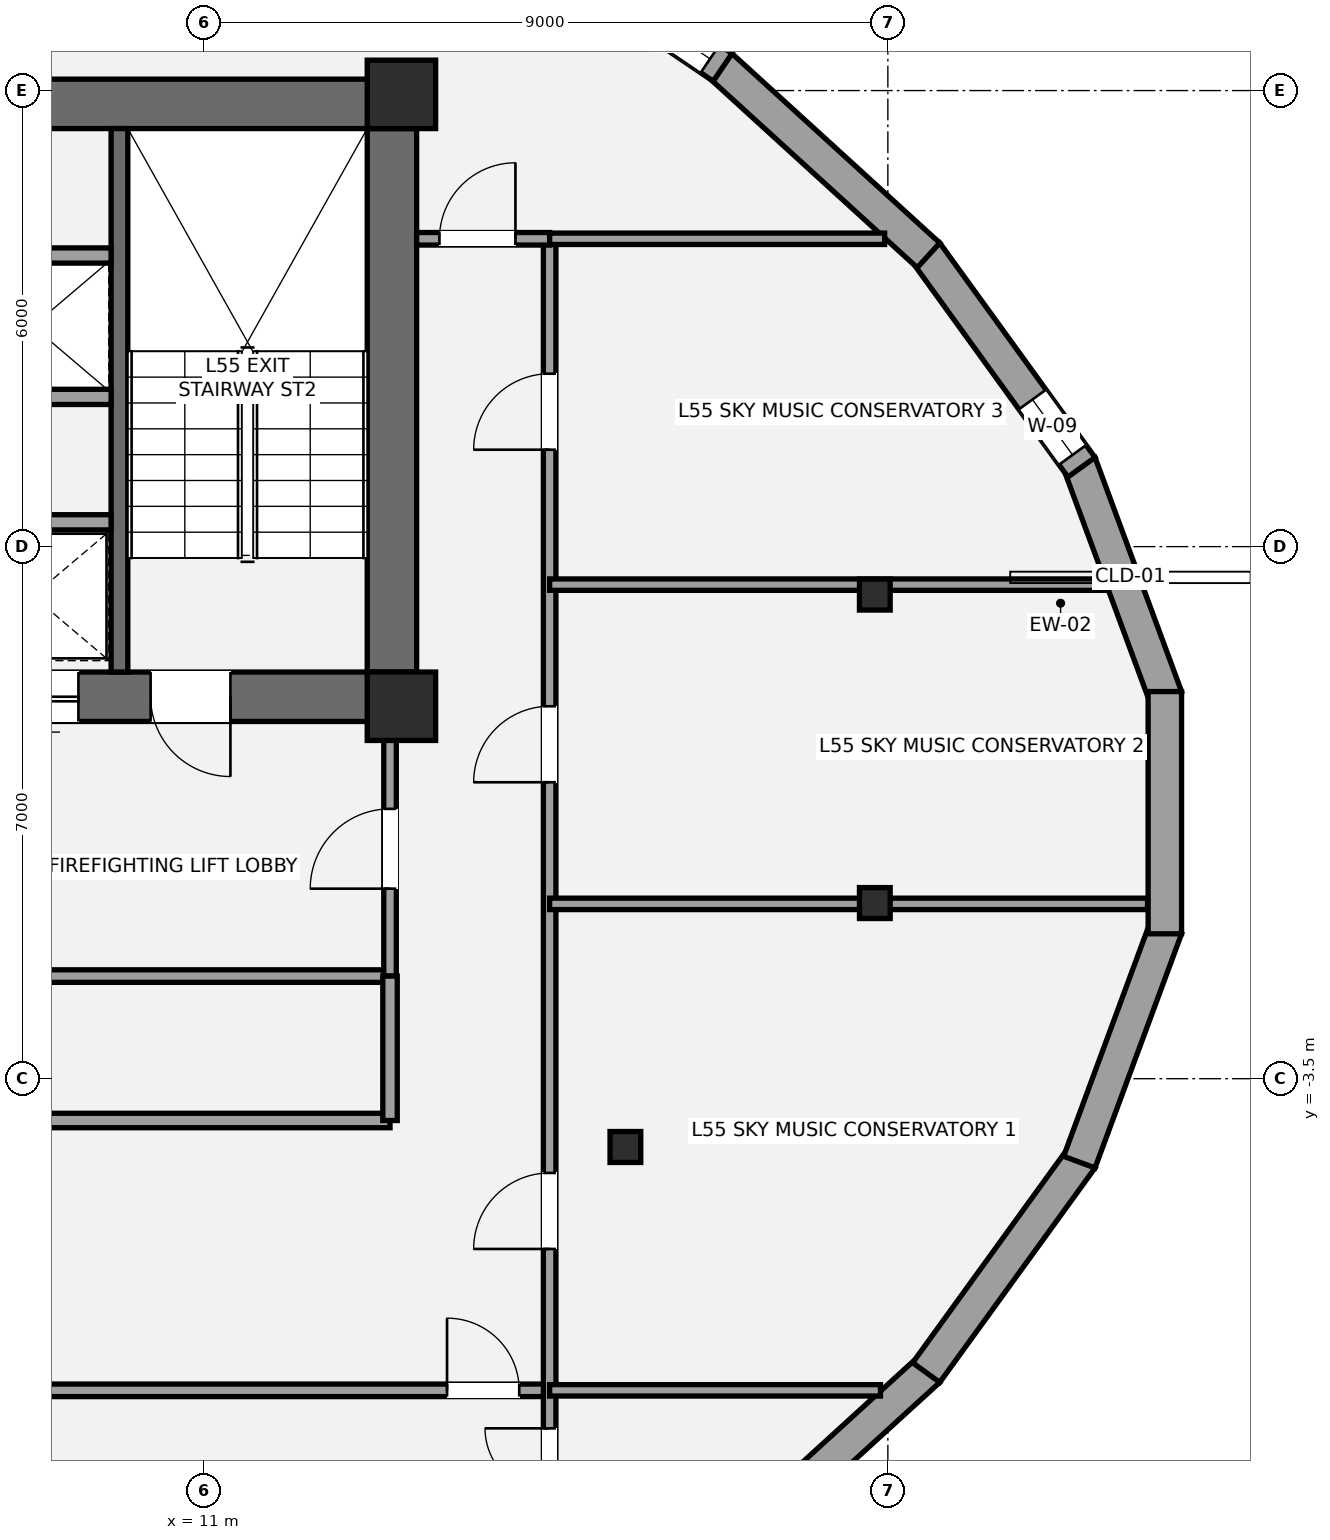
"""IFC4 building model, lengths in metres.
Left out: names, types, materials, properties, quantities, classifications, styles, units other than length and angle.
Written with IfcOpenShell. Run it as: python <this file> out.ifc"""

import sys

from ifc_helpers import new_model, si_unit, direction, frame, frame_2d, origin, origin_2d, place, context, subcontext, project, spatial, rectangle, i_section, extrude, element, fill, save


model = new_model("IFC4")
c1 = context("Model", 3, precision=1e-05, world=origin(), true_north=direction((0.0, 1.0)))
c2 = subcontext(c1, "Body", "Model", "MODEL_VIEW")
j1 = project(units=[si_unit("LENGTHUNIT", "METRE"), si_unit("PLANEANGLEUNIT", "RADIAN")], contexts=[c1])
p1 = place(None, origin())
s1 = spatial("IfcSite", under=j1, at=p1, CompositionType="ELEMENT")
p2 = place(p1, origin())
s2 = spatial("IfcBuilding", under=s1, at=p2, CompositionType="ELEMENT")
p3 = place(p2, frame((0.0, 0.0, 198.2)))
s3 = spatial("IfcBuildingStorey", under=s2, at=p3, CompositionType="ELEMENT", Elevation=198.2)
p4 = place(p3, frame((13.475, 1.2, 0.0), z_axis=(0.0, 0.0, 1.0), x_axis=(0.0, 1.0, 0.0)))
e1 = element("IfcWall", 1, at=p4, inside=s3, PredefinedType="SHEAR", context=c2, shape_type="SweptSolid", body=[
    extrude(rectangle(XDim=8.45, YDim=0.65, at=frame_2d((4.225, 0.0))), origin(), (0.0, 0.0, 1.0), 3.2),
])
p5 = place(p3, frame((4.475, 9.325, 0.0), z_axis=(0.0, 0.0, 1.0), x_axis=(1.0, 0.0, 0.0)))
e2 = element("IfcWall", 2, at=p5, inside=s3, PredefinedType="SHEAR", context=c2, shape_type="SweptSolid", body=[
    extrude(rectangle(XDim=9.325, YDim=0.65, at=frame_2d((4.663, 0.0))), origin(), (0.0, 0.0, 1.0), 3.2),
])
p6 = place(p3, frame((13.8, 1.525, 0.0), z_axis=(0.0, 0.0, 1.0), x_axis=(-1.0, 0.0, 0.0)))
e3 = element("IfcWall", 3, at=p6, inside=s3, PredefinedType="SHEAR", context=c2, shape_type="SweptSolid", body=[
    extrude(rectangle(XDim=8.925, YDim=0.65, at=frame_2d((4.462, 0.0))), origin(), (0.0, 0.0, 1.0), 3.2),
])
p7 = place(p6, frame((2.45, 0.0, 0.0)))
e4 = element("IfcOpeningElement", 4, at=p7, cuts=e3, PredefinedType="OPENING", context=c2, shape_type="SweptSolid", body=[
    extrude(rectangle(XDim=1.05, YDim=2.15, at=frame_2d((0.525, 1.075))), frame((0.0, 0.335, 0.0), z_axis=(0.0, -1.0, 0.0), x_axis=(1.0, 0.0, 0.0)), (0.0, 0.0, 1.0), 0.67),
])
p8 = place(p6, frame((4.45, 0.0, 0.0)))
e5 = element("IfcOpeningElement", 5, at=p8, cuts=e3, PredefinedType="OPENING", context=c2, shape_type="SweptSolid", body=[
    extrude(rectangle(XDim=1.1, YDim=2.2, at=frame_2d((0.55, 1.1))), frame((0.0, 0.335, 0.0), z_axis=(0.0, -1.0, 0.0), x_axis=(1.0, 0.0, 0.0)), (0.0, 0.0, 1.0), 0.67),
])
p9 = place(p3, frame((9.89, 1.85, 0.0), z_axis=(0.0, 0.0, 1.0), x_axis=(0.0, 1.0, 0.0)))
e6 = element("IfcWall", 6, at=p9, inside=s3, PredefinedType="SHEAR", context=c2, shape_type="SweptSolid", body=[
    extrude(rectangle(XDim=7.15, YDim=0.22, at=frame_2d((3.575, 0.0))), origin(), (0.0, 0.0, 1.0), 3.2),
])
for number, where, z_axis, x_axis in (
    (7, (13.6, 1.4, 0.0), (0.0, 0.0, 1.0), (1.0, 0.0, 0.0)),
    (8, (13.6, 9.45, 0.0), (0.0, 0.0, 1.0), (1.0, 0.0, 0.0)),
):
    element("IfcColumn", number, at=place(p3, frame(where, z_axis=z_axis, x_axis=x_axis)), inside=s3, PredefinedType="COLUMN", context=c2, shape_type="SweptSolid", body=[
        extrude(rectangle(XDim=0.9, YDim=0.9, at=origin_2d()), origin(), (0.0, 0.0, 1.0), 3.2),
    ])
for number, where, z_axis, x_axis in (
    (9, (19.828, 2.869, 0.0), (0.0, 0.0, 1.0), (1.0, 0.0, 0.0)),
    (10, (16.547, -4.398, 0.0), (0.0, 0.0, 1.0), (1.0, 0.0, 0.0)),
    (11, (19.828, -1.189, 0.0), (0.0, 0.0, 1.0), (1.0, 0.0, 0.0)),
):
    element("IfcColumn", number, at=place(p3, frame(where, z_axis=z_axis, x_axis=x_axis)), inside=s3, PredefinedType="COLUMN", context=c2, shape_type="SweptSolid", body=[
        extrude(i_section(OverallWidth=0.404, OverallDepth=0.407, WebThickness=0.027, FlangeThickness=0.044, at=origin_2d()), origin(), (0.0, 0.0, 1.0), 3.2),
    ])
p10 = place(p3, frame((22.519, 4.597, 0.0), z_axis=(0.0, 0.0, 1.0), x_axis=(0.346793746495, -0.937941414691, 0.0)))
e12 = element("IfcWall", 12, at=p10, inside=s3, PredefinedType="STANDARD", context=c2, shape_type="SweptSolid", body=[
    extrude(rectangle(XDim=3.284, YDim=0.44, at=frame_2d((1.642, 0.0))), origin(), (0.0, 0.0, 1.0), 2.255),
])
p11 = place(p3, frame((20.505, 7.366, 0.0), z_axis=(0.0, 0.0, 1.0), x_axis=(0.586378206793, -0.810037405678, 0.0)))
e13 = element("IfcWall", 13, at=p11, inside=s3, PredefinedType="STANDARD", context=c2, shape_type="SweptSolid", body=[
    extrude(rectangle(XDim=3.483, YDim=0.44, at=frame_2d((1.742, 0.0))), origin(), (0.0, 0.0, 1.0), 2.255),
])
p12 = place(p11, frame((2.383, 0.0, 0.42)))
e14 = element("IfcOpeningElement", 14, at=p12, cuts=e13, PredefinedType="OPENING", context=c2, shape_type="SweptSolid", body=[
    extrude(rectangle(XDim=0.9, YDim=1.35, at=frame_2d((0.45, 0.675))), frame((0.0, 0.23, 0.0), z_axis=(0.0, -1.0, 0.0), x_axis=(1.0, 0.0, 0.0)), (0.0, 0.0, 1.0), 0.46),
])
p13 = place(p3, frame((17.801, 9.824, 0.0), z_axis=(0.0, 0.0, 1.0), x_axis=(0.738992571182, -0.67371357396, 0.0)))
e15 = element("IfcWall", 15, at=p13, inside=s3, PredefinedType="STANDARD", context=c2, shape_type="SweptSolid", body=[
    extrude(rectangle(XDim=3.699, YDim=0.44, at=frame_2d((1.849, 0.0))), origin(), (0.0, 0.0, 1.0), 2.255),
])
p14 = place(p3, frame((14.607, 11.987, 0.0), z_axis=(0.0, 0.0, 1.0), x_axis=(0.827697624009, -0.561174342972, 0.0)))
e16 = element("IfcWall", 16, at=p14, inside=s3, PredefinedType="STANDARD", context=c2, shape_type="SweptSolid", body=[
    extrude(rectangle(XDim=3.888, YDim=0.44, at=frame_2d((1.944, 0.0))), origin(), (0.0, 0.0, 1.0), 2.255),
])
p15 = place(p14, frame((2.789, 0.0, 0.58)))
e17 = element("IfcOpeningElement", 17, at=p15, cuts=e16, PredefinedType="OPENING", context=c2, shape_type="SweptSolid", body=[
    extrude(rectangle(XDim=0.9, YDim=1.35, at=frame_2d((0.45, 0.675))), frame((0.0, 0.23, 0.0), z_axis=(0.0, -1.0, 0.0), x_axis=(1.0, 0.0, 0.0)), (0.0, 0.0, 1.0), 0.46),
])
p16 = place(p3, frame((20.535, -7.333, 0.0), z_axis=(0.0, 0.0, 1.0), x_axis=(-0.738992571182, -0.67371357396, 0.0)))
e18 = element("IfcWall", 18, at=p16, inside=s3, PredefinedType="STANDARD", context=c2, shape_type="SweptSolid", body=[
    extrude(rectangle(XDim=3.699, YDim=0.44, at=frame_2d((1.849, 0.0))), origin(), (0.0, 0.0, 1.0), 2.255),
])
p17 = place(p3, frame((22.547, -4.545, 0.0), z_axis=(0.0, 0.0, 1.0), x_axis=(-0.586378206793, -0.810037405678, 0.0)))
e19 = element("IfcWall", 19, at=p17, inside=s3, PredefinedType="STANDARD", context=c2, shape_type="SweptSolid", body=[
    extrude(rectangle(XDim=3.483, YDim=0.44, at=frame_2d((1.742, 0.0))), origin(), (0.0, 0.0, 1.0), 2.255),
])
p18 = place(p3, frame((23.658, -1.517, 0.0), z_axis=(0.0, 0.0, 1.0), x_axis=(-0.346793746495, -0.937941414691, 0.0)))
e20 = element("IfcWall", 20, at=p18, inside=s3, PredefinedType="STANDARD", context=c2, shape_type="SweptSolid", body=[
    extrude(rectangle(XDim=3.284, YDim=0.44, at=frame_2d((1.642, 0.0))), origin(), (0.0, 0.0, 1.0), 2.255),
])
p19 = place(p3, frame((23.644, 1.594, 0.0), z_axis=(0.0, 0.0, 1.0), x_axis=(0.0, -1.0, 0.0)))
e21 = element("IfcWall", 21, at=p19, inside=s3, PredefinedType="STANDARD", context=c2, shape_type="SweptSolid", body=[
    extrude(rectangle(XDim=3.187, YDim=0.44, at=frame_2d((1.594, 0.0))), origin(), (0.0, 0.0, 1.0), 2.259),
])
p20 = place(p3, frame((7.2, -2.15, 0.0), z_axis=(0.0, 0.0, 1.0), x_axis=(1.0, 0.0, 0.0)))
e22 = element("IfcWall", 22, at=p20, inside=s3, PredefinedType="PARTITIONING", context=c2, shape_type="SweptSolid", body=[
    extrude(rectangle(XDim=6.25, YDim=0.165, at=frame_2d((3.125, 0.0))), origin(), (0.0, 0.0, 1.0), 2.96),
])
p21 = place(p3, frame((13.45, -2.15, 0.0), z_axis=(0.0, 0.0, 1.0), x_axis=(0.0, 1.0, 0.0)))
e23 = element("IfcWall", 23, at=p21, inside=s3, PredefinedType="PARTITIONING", context=c2, shape_type="SweptSolid", body=[
    extrude(rectangle(XDim=3.4, YDim=0.165, at=frame_2d((1.7, 0.0))), origin(), (0.0, 0.0, 1.0), 2.413),
])
p22 = place(p21, frame((1.15, 0.0, 0.0)))
e24 = element("IfcOpeningElement", 24, at=p22, cuts=e23, PredefinedType="OPENING", context=c2, shape_type="SweptSolid", body=[
    extrude(rectangle(XDim=1.05, YDim=2.15, at=frame_2d((0.525, 1.075))), frame((0.0, 0.093, 0.0), z_axis=(0.0, -1.0, 0.0), x_axis=(1.0, 0.0, 0.0)), (0.0, 0.0, 1.0), 0.185),
])
p23 = place(p3, frame((5.525, 3.82, 0.0), z_axis=(0.0, 0.0, 1.0), x_axis=(1.0, 0.0, 0.0)))
e25 = element("IfcWall", 25, at=p23, inside=s3, PredefinedType="SOLIDWALL", context=c2, shape_type="SweptSolid", body=[
    extrude(rectangle(XDim=4.255, YDim=0.2, at=frame_2d((2.127, 0.0))), origin(), (0.0, 0.0, 1.0), 2.96),
])
p24 = place(p23, frame((0.65, 0.0, 0.0)))
e26 = element("IfcOpeningElement", 26, at=p24, cuts=e25, PredefinedType="OPENING", context=c2, shape_type="SweptSolid", body=[
    extrude(rectangle(XDim=1.2, YDim=2.2, at=frame_2d((0.6, 1.1))), frame((0.0, 0.11, 0.0), z_axis=(0.0, -1.0, 0.0), x_axis=(1.0, 0.0, 0.0)), (0.0, 0.0, 1.0), 0.22),
])
for number, where, z_axis, x_axis in (
    (27, (5.525, 5.47, 0.0), (0.0, 0.0, 1.0), (1.0, 0.0, 0.0)),
    (28, (5.525, 7.33, 0.0), (0.0, 0.0, 1.0), (1.0, 0.0, 0.0)),
):
    element("IfcWall", number, at=place(p3, frame(where, z_axis=z_axis, x_axis=x_axis)), inside=s3, PredefinedType="SOLIDWALL", context=c2, shape_type="SweptSolid", body=[
        extrude(rectangle(XDim=4.255, YDim=0.2, at=frame_2d((2.127, 0.0))), origin(), (0.0, 0.0, 1.0), 2.96),
    ])
p25 = place(p3, frame((2.1, -4.05, 0.0), z_axis=(0.0, 0.0, 1.0), x_axis=(1.0, 0.0, 0.0)))
e29 = element("IfcWall", 29, at=p25, inside=s3, PredefinedType="PLUMBINGWALL", context=c2, shape_type="SweptSolid", body=[
    extrude(rectangle(XDim=11.35, YDim=0.19, at=frame_2d((5.675, 0.0))), origin(), (0.0, 0.0, 1.0), 2.413),
])
p26 = place(p25, frame((5.2, 0.0, 0.0)))
e30 = element("IfcOpeningElement", 30, at=p26, cuts=e29, PredefinedType="OPENING", context=c2, shape_type="SweptSolid", body=[
    extrude(rectangle(XDim=0.9, YDim=2.1, at=frame_2d((0.45, 1.05))), frame((0.0, 0.105, 0.0), z_axis=(0.0, -1.0, 0.0), x_axis=(1.0, 0.0, 0.0)), (0.0, 0.0, 1.0), 0.21),
])
p27 = place(p3, frame((13.45, -4.05, 0.0), z_axis=(0.0, 0.0, 1.0), x_axis=(0.0, 1.0, 0.0)))
e31 = element("IfcWall", 31, at=p27, inside=s3, PredefinedType="PLUMBINGWALL", context=c2, shape_type="SweptSolid", body=[
    extrude(rectangle(XDim=1.9, YDim=0.19, at=frame_2d((0.95, 0.0))), origin(), (0.0, 0.0, 1.0), 2.413),
])
p28 = place(p3, frame((-16.8, -7.6, 0.0), z_axis=(0.0, 0.0, 1.0), x_axis=(1.0, 0.0, 0.0)))
e32 = element("IfcWall", 32, at=p28, inside=s3, PredefinedType="PARTITIONING", context=c2, shape_type="SweptSolid", body=[
    extrude(rectangle(XDim=32.35, YDim=0.165, at=frame_2d((16.175, 0.0))), origin(), (0.0, 0.0, 1.0), 2.338),
])
p29 = place(p28, frame((15.45, 0.0, 0.0)))
e33 = element("IfcOpeningElement", 33, at=p29, cuts=e32, PredefinedType="OPENING", context=c2, shape_type="SweptSolid", body=[
    extrude(rectangle(XDim=0.95, YDim=2.15, at=frame_2d((0.475, 1.075))), frame((0.0, 0.093, 0.0), z_axis=(0.0, -1.0, 0.0), x_axis=(1.0, 0.0, 0.0)), (0.0, 0.0, 1.0), 0.185),
])
p30 = place(p28, frame((31.0, 0.0, 0.0)))
e34 = element("IfcOpeningElement", 34, at=p30, cuts=e32, PredefinedType="OPENING", context=c2, shape_type="SweptSolid", body=[
    extrude(rectangle(XDim=0.95, YDim=2.15, at=frame_2d((0.475, 1.075))), frame((0.0, 0.093, 0.0), z_axis=(0.0, -1.0, 0.0), x_axis=(1.0, 0.0, 0.0)), (0.0, 0.0, 1.0), 0.185),
])
p31 = place(p3, frame((15.55, -11.073, 0.0), z_axis=(0.0, 0.0, 1.0), x_axis=(0.0, 1.0, 0.0)))
e35 = element("IfcWall", 35, at=p31, inside=s3, PredefinedType="PARTITIONING", context=c2, shape_type="SweptSolid", body=[
    extrude(rectangle(XDim=18.623, YDim=0.165, at=frame_2d((9.311, 0.0))), origin(), (0.0, 0.0, 1.0), 2.413),
])
p32 = place(p31, frame((2.123, 0.0, 0.0)))
e36 = element("IfcOpeningElement", 36, at=p32, cuts=e35, PredefinedType="OPENING", context=c2, shape_type="SweptSolid", body=[
    extrude(rectangle(XDim=0.85, YDim=2.1, at=frame_2d((0.425, 1.05))), frame((0.0, 0.093, 0.0), z_axis=(0.0, -1.0, 0.0), x_axis=(1.0, 0.0, 0.0)), (0.0, 0.0, 1.0), 0.185),
])
p33 = place(p31, frame((5.333, 0.0, 0.0)))
e37 = element("IfcOpeningElement", 37, at=p33, cuts=e35, PredefinedType="OPENING", context=c2, shape_type="SweptSolid", body=[
    extrude(rectangle(XDim=1.0, YDim=2.15, at=frame_2d((0.5, 1.075))), frame((0.0, 0.093, 0.0), z_axis=(0.0, -1.0, 0.0), x_axis=(1.0, 0.0, 0.0)), (0.0, 0.0, 1.0), 0.185),
])
p34 = place(p31, frame((11.472, 0.0, 0.0)))
e38 = element("IfcOpeningElement", 38, at=p34, cuts=e35, PredefinedType="OPENING", context=c2, shape_type="SweptSolid", body=[
    extrude(rectangle(XDim=1.0, YDim=2.15, at=frame_2d((0.5, 1.075))), frame((0.0, 0.093, 0.0), z_axis=(0.0, -1.0, 0.0), x_axis=(1.0, 0.0, 0.0)), (0.0, 0.0, 1.0), 0.185),
])
p35 = place(p31, frame((15.847, 0.0, 0.0)))
e39 = element("IfcOpeningElement", 39, at=p35, cuts=e35, PredefinedType="OPENING", context=c2, shape_type="SweptSolid", body=[
    extrude(rectangle(XDim=1.0, YDim=2.15, at=frame_2d((0.5, 1.075))), frame((0.0, 0.093, 0.0), z_axis=(0.0, -1.0, 0.0), x_axis=(1.0, 0.0, 0.0)), (0.0, 0.0, 1.0), 0.185),
])
p36 = place(p3, frame((13.8, 7.55, 0.0), z_axis=(0.0, 0.0, 1.0), x_axis=(1.0, 0.0, 0.0)))
e40 = element("IfcWall", 40, at=p36, inside=s3, PredefinedType="PARTITIONING", context=c2, shape_type="SweptSolid", body=[
    extrude(rectangle(XDim=1.75, YDim=0.165, at=frame_2d((0.875, 0.0))), origin(), (0.0, 0.0, 1.0), 2.96),
])
p37 = place(p36, frame((0.3, 0.0, 0.0)))
e41 = element("IfcOpeningElement", 41, at=p37, cuts=e40, PredefinedType="OPENING", context=c2, shape_type="SweptSolid", body=[
    extrude(rectangle(XDim=1.0, YDim=2.15, at=frame_2d((0.5, 1.075))), frame((0.0, 0.093, 0.0), z_axis=(0.0, -1.0, 0.0), x_axis=(1.0, 0.0, 0.0)), (0.0, 0.0, 1.0), 0.185),
])
p38 = place(p3, frame((15.55, 7.55, 0.0), z_axis=(0.0, 0.0, 1.0), x_axis=(1.0, 0.0, 0.0)))
e42 = element("IfcWall", 42, at=p38, inside=s3, PredefinedType="PLUMBINGWALL", context=c2, shape_type="SweptSolid", body=[
    extrude(rectangle(XDim=4.408, YDim=0.15, at=frame_2d((2.204, 0.0))), origin(), (0.0, 0.0, 1.0), 2.413),
])
p39 = place(p3, frame((15.55, -7.6, 0.0), z_axis=(0.0, 0.0, 1.0), x_axis=(1.0, 0.0, 0.0)))
e43 = element("IfcWall", 43, at=p39, inside=s3, PredefinedType="PLUMBINGWALL", context=c2, shape_type="SweptSolid", body=[
    extrude(rectangle(XDim=4.353, YDim=0.15, at=frame_2d((2.176, 0.0))), origin(), (0.0, 0.0, 1.0), 2.96),
])
p40 = place(p3, frame((15.55, -1.2, 0.0), z_axis=(0.0, 0.0, 1.0), x_axis=(1.0, 0.0, 0.0)))
e44 = element("IfcWall", 44, at=p40, inside=s3, PredefinedType="PLUMBINGWALL", context=c2, shape_type="SweptSolid", body=[
    extrude(rectangle(XDim=7.866, YDim=0.15, at=frame_2d((3.933, 0.0))), origin(), (0.0, 0.0, 1.0), 2.338),
])
p41 = place(p3, frame((15.55, 3.0, 0.0), z_axis=(0.0, 0.0, 1.0), x_axis=(1.0, 0.0, 0.0)))
e45 = element("IfcWall", 45, at=p41, inside=s3, PredefinedType="PLUMBINGWALL", context=c2, shape_type="SweptSolid", body=[
    extrude(rectangle(XDim=7.317, YDim=0.15, at=frame_2d((3.658, 0.0))), origin(), (0.0, 0.0, 1.0), 2.413),
])
p42 = place(p12, origin())
e46 = element("IfcWindow", 46, at=p42, inside=s3, PartitioningType="SINGLE_PANEL", PredefinedType="WINDOW", context=c2, shape_type="SweptSolid", body=[
    extrude(rectangle(XDim=0.9, YDim=1.35, at=frame_2d((0.45, 0.675))), frame((0.0, -0.01, 0.0), z_axis=(0.0, -1.0, 0.0), x_axis=(1.0, 0.0, 0.0)), (0.0, 0.0, 1.0), 0.06),
])
fill(e14, e46)
p43 = place(p15, origin())
e47 = element("IfcWindow", 47, at=p43, inside=s3, PartitioningType="SINGLE_PANEL", PredefinedType="WINDOW", context=c2, shape_type="SweptSolid", body=[
    extrude(rectangle(XDim=0.9, YDim=1.35, at=frame_2d((0.45, 0.675))), frame((0.0, -0.01, 0.0), z_axis=(0.0, -1.0, 0.0), x_axis=(1.0, 0.0, 0.0)), (0.0, 0.0, 1.0), 0.06),
])
fill(e17, e47)
p44 = place(p7, origin())
e48 = element("IfcDoor", 48, at=p44, inside=s3, OperationType="SINGLE_SWING_LEFT", PredefinedType="DOOR", context=c2, shape_type="SweptSolid", body=[
    extrude(rectangle(XDim=1.05, YDim=2.15, at=frame_2d((0.525, 1.075))), frame((0.0, 0.025, 0.0), z_axis=(0.0, -1.0, 0.0), x_axis=(1.0, 0.0, 0.0)), (0.0, 0.0, 1.0), 0.05),
])
fill(e4, e48)
p45 = place(p22, origin())
e49 = element("IfcDoor", 49, at=p45, inside=s3, OperationType="SINGLE_SWING_LEFT", PredefinedType="DOOR", context=c2, shape_type="SweptSolid", body=[
    extrude(rectangle(XDim=1.05, YDim=2.15, at=frame_2d((0.525, 1.075))), frame((0.0, 0.025, 0.0), z_axis=(0.0, -1.0, 0.0), x_axis=(1.0, 0.0, 0.0)), (0.0, 0.0, 1.0), 0.05),
])
fill(e24, e49)
p46 = place(p8, origin())
e50 = element("IfcDoor", 50, at=p46, inside=s3, OperationType="SLIDING_TO_LEFT", PredefinedType="DOOR", context=c2, shape_type="SweptSolid", body=[
    extrude(rectangle(XDim=1.1, YDim=2.2, at=frame_2d((0.55, 1.1))), frame((0.0, 0.025, 0.0), z_axis=(0.0, -1.0, 0.0), x_axis=(1.0, 0.0, 0.0)), (0.0, 0.0, 1.0), 0.05),
])
fill(e5, e50)
p47 = place(p37, origin())
e51 = element("IfcDoor", 51, at=p47, inside=s3, OperationType="SINGLE_SWING_RIGHT", PredefinedType="DOOR", context=c2, shape_type="SweptSolid", body=[
    extrude(rectangle(XDim=1.0, YDim=2.15, at=frame_2d((0.5, 1.075))), frame((0.0, 0.025, 0.0), z_axis=(0.0, -1.0, 0.0), x_axis=(1.0, 0.0, 0.0)), (0.0, 0.0, 1.0), 0.05),
])
fill(e41, e51)
p48 = place(p32, origin())
e52 = element("IfcDoor", 52, at=p48, inside=s3, OperationType="SINGLE_SWING_RIGHT", PredefinedType="DOOR", context=c2, shape_type="SweptSolid", body=[
    extrude(rectangle(XDim=0.85, YDim=2.1, at=frame_2d((0.425, 1.05))), frame((0.0, 0.025, 0.0), z_axis=(0.0, -1.0, 0.0), x_axis=(1.0, 0.0, 0.0)), (0.0, 0.0, 1.0), 0.05),
])
fill(e36, e52)
p49 = place(p30, origin())
e53 = element("IfcDoor", 53, at=p49, inside=s3, OperationType="SINGLE_SWING_LEFT", PredefinedType="DOOR", context=c2, shape_type="SweptSolid", body=[
    extrude(rectangle(XDim=0.95, YDim=2.15, at=frame_2d((0.475, 1.075))), frame((0.0, 0.025, 0.0), z_axis=(0.0, -1.0, 0.0), x_axis=(1.0, 0.0, 0.0)), (0.0, 0.0, 1.0), 0.05),
])
fill(e34, e53)
p50 = place(p33, origin())
e54 = element("IfcDoor", 54, at=p50, inside=s3, OperationType="SINGLE_SWING_LEFT", PredefinedType="DOOR", context=c2, shape_type="SweptSolid", body=[
    extrude(rectangle(XDim=1.0, YDim=2.15, at=frame_2d((0.5, 1.075))), frame((0.0, 0.025, 0.0), z_axis=(0.0, -1.0, 0.0), x_axis=(1.0, 0.0, 0.0)), (0.0, 0.0, 1.0), 0.05),
])
fill(e37, e54)
p51 = place(p34, origin())
e55 = element("IfcDoor", 55, at=p51, inside=s3, OperationType="SINGLE_SWING_LEFT", PredefinedType="DOOR", context=c2, shape_type="SweptSolid", body=[
    extrude(rectangle(XDim=1.0, YDim=2.15, at=frame_2d((0.5, 1.075))), frame((0.0, 0.025, 0.0), z_axis=(0.0, -1.0, 0.0), x_axis=(1.0, 0.0, 0.0)), (0.0, 0.0, 1.0), 0.05),
])
fill(e38, e55)
p52 = place(p35, origin())
e56 = element("IfcDoor", 56, at=p52, inside=s3, OperationType="SINGLE_SWING_LEFT", PredefinedType="DOOR", context=c2, shape_type="SweptSolid", body=[
    extrude(rectangle(XDim=1.0, YDim=2.15, at=frame_2d((0.5, 1.075))), frame((0.0, 0.025, 0.0), z_axis=(0.0, -1.0, 0.0), x_axis=(1.0, 0.0, 0.0)), (0.0, 0.0, 1.0), 0.05),
])
fill(e39, e56)
save(model, sys.argv[1])
